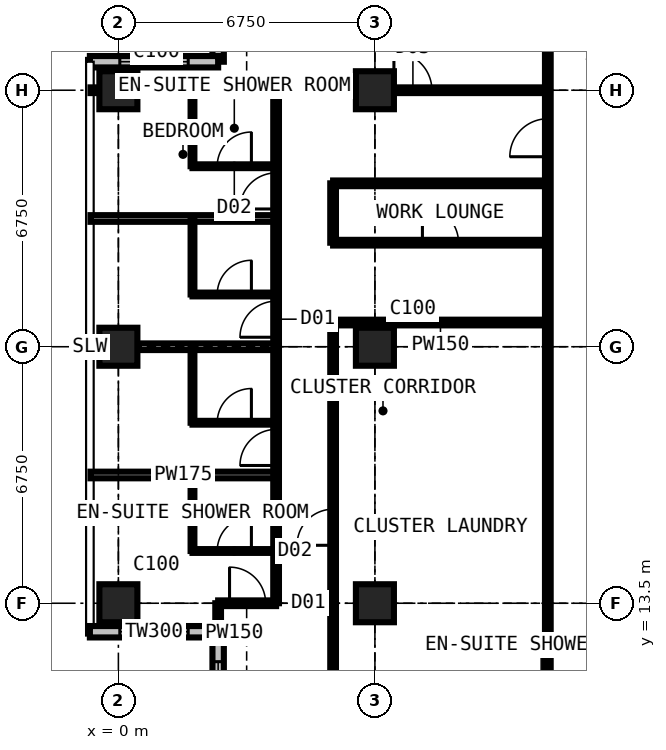
"""IFC4 building model, lengths in metres.
Left out: names, types, materials, properties, quantities, classifications, styles, units other than length and angle.
Written with IfcOpenShell. Run it as: python <this file> out.ifc"""

import sys

from ifc_helpers import new_model, si_unit, direction, frame, frame_2d, origin, origin_2d, place, context, subcontext, project, spatial, rectangle, extrude, element, fill, save


model = new_model("IFC4")
c1 = context("Model", 3, precision=1e-05, world=origin(), true_north=direction((0.0, 1.0)))
c2 = subcontext(c1, "Body", "Model", "MODEL_VIEW")
j1 = project(units=[si_unit("LENGTHUNIT", "METRE"), si_unit("PLANEANGLEUNIT", "RADIAN")], contexts=[c1])
p1 = place(None, origin())
s1 = spatial("IfcSite", under=j1, at=p1, CompositionType="ELEMENT")
p2 = place(p1, origin())
s2 = spatial("IfcBuilding", under=s1, at=p2, CompositionType="ELEMENT")
p3 = place(p2, frame((0.0, 0.0, 251.1)))
s3 = spatial("IfcBuildingStorey", under=s2, at=p3, CompositionType="ELEMENT", Elevation=251.1)
for number, where, z_axis, x_axis in (
    (1, (0.0, 13.5, 0.0), (0.0, 0.0, 1.0), (1.0, 0.0, 0.0)),
    (2, (0.0, 20.25, 0.0), (0.0, 0.0, 1.0), (1.0, 0.0, 0.0)),
    (3, (0.0, 27.0, 0.0), (0.0, 0.0, 1.0), (1.0, 0.0, 0.0)),
    (4, (6.75, 13.5, 0.0), (0.0, 0.0, 1.0), (1.0, 0.0, 0.0)),
    (5, (6.75, 20.25, 0.0), (0.0, 0.0, 1.0), (1.0, 0.0, 0.0)),
    (6, (6.75, 27.0, 0.0), (0.0, 0.0, 1.0), (1.0, 0.0, 0.0)),
):
    element("IfcColumn", number, at=place(p3, frame(where, z_axis=z_axis, x_axis=x_axis)), inside=s3, PredefinedType="COLUMN", context=c2, shape_type="SweptSolid", body=[
        extrude(rectangle(XDim=1.0, YDim=1.0, at=origin_2d()), origin(), (0.0, 0.0, 1.0), 3.6),
    ])
p4 = place(p3, frame((2.625, 31.125, 0.0), z_axis=(0.0, 0.0, 1.0), x_axis=(0.0, -1.0, 0.0)))
e7 = element("IfcWall", 7, at=p4, inside=s3, PredefinedType="SOLIDWALL", context=c2, shape_type="SweptSolid", body=[
    extrude(rectangle(XDim=3.375, YDim=0.3, at=frame_2d((1.688, 0.0))), origin(), (0.0, 0.0, 1.0), 3.3),
])
p5 = place(p4, frame((0.788, 0.0, 0.6)))
e8 = element("IfcOpeningElement", 8, at=p5, cuts=e7, PredefinedType="OPENING", context=c2, shape_type="SweptSolid", body=[
    extrude(rectangle(XDim=1.8, YDim=2.1, at=frame_2d((0.9, 1.05))), frame((0.0, 0.16, 0.0), z_axis=(0.0, -1.0, 0.0), x_axis=(1.0, 0.0, 0.0)), (0.0, 0.0, 1.0), 0.32),
])
p6 = place(p3, frame((2.625, 27.75, 0.0), z_axis=(0.0, 0.0, 1.0), x_axis=(-1.0, 0.0, 0.0)))
e9 = element("IfcWall", 9, at=p6, inside=s3, PredefinedType="SOLIDWALL", context=c2, shape_type="SweptSolid", body=[
    extrude(rectangle(XDim=3.375, YDim=0.3, at=frame_2d((1.688, 0.0))), origin(), (0.0, 0.0, 1.0), 3.3),
])
p7 = place(p6, frame((0.788, 0.0, 0.6)))
e10 = element("IfcOpeningElement", 10, at=p7, cuts=e9, PredefinedType="OPENING", context=c2, shape_type="SweptSolid", body=[
    extrude(rectangle(XDim=1.8, YDim=2.1, at=frame_2d((0.9, 1.05))), frame((0.0, 0.16, 0.0), z_axis=(0.0, -1.0, 0.0), x_axis=(1.0, 0.0, 0.0)), (0.0, 0.0, 1.0), 0.32),
])
p8 = place(p3, frame((-0.75, 12.75, 0.0), z_axis=(0.0, 0.0, 1.0), x_axis=(1.0, 0.0, 0.0)))
e11 = element("IfcWall", 11, at=p8, inside=s3, PredefinedType="SOLIDWALL", context=c2, shape_type="SweptSolid", body=[
    extrude(rectangle(XDim=3.375, YDim=0.3, at=frame_2d((1.688, 0.0))), origin(), (0.0, 0.0, 1.0), 3.3),
])
p9 = place(p8, frame((0.788, 0.0, 0.6)))
e12 = element("IfcOpeningElement", 12, at=p9, cuts=e11, PredefinedType="OPENING", context=c2, shape_type="SweptSolid", body=[
    extrude(rectangle(XDim=1.8, YDim=2.1, at=frame_2d((0.9, 1.05))), frame((0.0, 0.16, 0.0), z_axis=(0.0, -1.0, 0.0), x_axis=(1.0, 0.0, 0.0)), (0.0, 0.0, 1.0), 0.32),
])
p10 = place(p3, frame((2.625, 12.75, 0.0), z_axis=(0.0, 0.0, 1.0), x_axis=(0.0, -1.0, 0.0)))
e13 = element("IfcWall", 13, at=p10, inside=s3, PredefinedType="SOLIDWALL", context=c2, shape_type="SweptSolid", body=[
    extrude(rectangle(XDim=3.375, YDim=0.3, at=frame_2d((1.688, 0.0))), origin(), (0.0, 0.0, 1.0), 3.3),
])
p11 = place(p10, frame((0.788, 0.0, 0.6)))
e14 = element("IfcOpeningElement", 14, at=p11, cuts=e13, PredefinedType="OPENING", context=c2, shape_type="SweptSolid", body=[
    extrude(rectangle(XDim=1.8, YDim=2.1, at=frame_2d((0.9, 1.05))), frame((0.0, 0.16, 0.0), z_axis=(0.0, -1.0, 0.0), x_axis=(1.0, 0.0, 0.0)), (0.0, 0.0, 1.0), 0.32),
])
p12 = place(p3, frame((-0.734, 16.875, 0.0), z_axis=(0.0, 0.0, 1.0), x_axis=(1.0, 0.0, 0.0)))
e15 = element("IfcWall", 15, at=p12, inside=s3, PredefinedType="PARTITIONING", context=c2, shape_type="SweptSolid", body=[
    extrude(rectangle(XDim=4.884, YDim=0.175, at=frame_2d((2.442, 0.0))), origin(), (0.0, 0.0, 1.0), 3.3),
])
p13 = place(p3, frame((-0.734, 20.25, 0.0), z_axis=(0.0, 0.0, 1.0), x_axis=(1.0, 0.0, 0.0)))
e16 = element("IfcWall", 16, at=p13, inside=s3, PredefinedType="PARTITIONING", context=c2, shape_type="SweptSolid", body=[
    extrude(rectangle(XDim=4.884, YDim=0.175, at=frame_2d((2.442, 0.0))), origin(), (0.0, 0.0, 1.0), 2.802),
])
p14 = place(p3, frame((-0.734, 23.625, 0.0), z_axis=(0.0, 0.0, 1.0), x_axis=(1.0, 0.0, 0.0)))
e17 = element("IfcWall", 17, at=p14, inside=s3, PredefinedType="PARTITIONING", context=c2, shape_type="SweptSolid", body=[
    extrude(rectangle(XDim=4.884, YDim=0.175, at=frame_2d((2.442, 0.0))), origin(), (0.0, 0.0, 1.0), 3.3),
])
p15 = place(p3, frame((-0.734, 27.0, 0.0), z_axis=(0.0, 0.0, 1.0), x_axis=(1.0, 0.0, 0.0)))
e18 = element("IfcWall", 18, at=p15, inside=s3, PredefinedType="PARTITIONING", context=c2, shape_type="SweptSolid", body=[
    extrude(rectangle(XDim=12.034, YDim=0.15, at=frame_2d((6.017, 0.0))), origin(), (0.0, 0.0, 1.0), 2.802),
])
p16 = place(p15, frame((7.984, 0.0, 0.0)))
e19 = element("IfcOpeningElement", 19, at=p16, cuts=e18, PredefinedType="OPENING", context=c2, shape_type="SweptSolid", body=[
    extrude(rectangle(XDim=1.0, YDim=2.2, at=frame_2d((0.5, 1.1))), frame((0.0, 0.085, 0.0), z_axis=(0.0, -1.0, 0.0), x_axis=(1.0, 0.0, 0.0)), (0.0, 0.0, 1.0), 0.17),
])
p17 = place(p3, frame((1.95, 14.875, 0.0), z_axis=(0.0, 0.0, 1.0), x_axis=(0.0, 1.0, 0.0)))
e20 = element("IfcWall", 20, at=p17, inside=s3, PredefinedType="PARTITIONING", context=c2, shape_type="SweptSolid", body=[
    extrude(rectangle(XDim=2.0, YDim=0.1, at=frame_2d((1.0, 0.0))), origin(), (0.0, 0.0, 1.0), 3.3),
])
p18 = place(p3, frame((1.95, 14.875, 0.0), z_axis=(0.0, 0.0, 1.0), x_axis=(1.0, 0.0, 0.0)))
e21 = element("IfcWall", 21, at=p18, inside=s3, PredefinedType="PARTITIONING", context=c2, shape_type="SweptSolid", body=[
    extrude(rectangle(XDim=2.2, YDim=0.1, at=frame_2d((1.1, 0.0))), origin(), (0.0, 0.0, 1.0), 3.3),
])
p19 = place(p18, frame((0.65, 0.0, 0.0)))
e22 = element("IfcOpeningElement", 22, at=p19, cuts=e21, PredefinedType="OPENING", context=c2, shape_type="SweptSolid", body=[
    extrude(rectangle(XDim=0.9, YDim=2.2, at=frame_2d((0.45, 1.1))), frame((0.0, 0.06, 0.0), z_axis=(0.0, -1.0, 0.0), x_axis=(1.0, 0.0, 0.0)), (0.0, 0.0, 1.0), 0.12),
])
p20 = place(p3, frame((1.95, 18.25, 0.0), z_axis=(0.0, 0.0, 1.0), x_axis=(0.0, 1.0, 0.0)))
e23 = element("IfcWall", 23, at=p20, inside=s3, PredefinedType="PARTITIONING", context=c2, shape_type="SweptSolid", body=[
    extrude(rectangle(XDim=2.0, YDim=0.1, at=frame_2d((1.0, 0.0))), origin(), (0.0, 0.0, 1.0), 3.3),
])
p21 = place(p3, frame((1.95, 18.25, 0.0), z_axis=(0.0, 0.0, 1.0), x_axis=(1.0, 0.0, 0.0)))
e24 = element("IfcWall", 24, at=p21, inside=s3, PredefinedType="PARTITIONING", context=c2, shape_type="SweptSolid", body=[
    extrude(rectangle(XDim=2.2, YDim=0.1, at=frame_2d((1.1, 0.0))), origin(), (0.0, 0.0, 1.0), 3.3),
])
p22 = place(p21, frame((0.65, 0.0, 0.0)))
e25 = element("IfcOpeningElement", 25, at=p22, cuts=e24, PredefinedType="OPENING", context=c2, shape_type="SweptSolid", body=[
    extrude(rectangle(XDim=0.9, YDim=2.2, at=frame_2d((0.45, 1.1))), frame((0.0, 0.06, 0.0), z_axis=(0.0, -1.0, 0.0), x_axis=(1.0, 0.0, 0.0)), (0.0, 0.0, 1.0), 0.12),
])
p23 = place(p3, frame((1.95, 21.625, 0.0), z_axis=(0.0, 0.0, 1.0), x_axis=(0.0, 1.0, 0.0)))
e26 = element("IfcWall", 26, at=p23, inside=s3, PredefinedType="PARTITIONING", context=c2, shape_type="SweptSolid", body=[
    extrude(rectangle(XDim=2.0, YDim=0.1, at=frame_2d((1.0, 0.0))), origin(), (0.0, 0.0, 1.0), 3.3),
])
p24 = place(p3, frame((1.95, 21.625, 0.0), z_axis=(0.0, 0.0, 1.0), x_axis=(1.0, 0.0, 0.0)))
e27 = element("IfcWall", 27, at=p24, inside=s3, PredefinedType="PARTITIONING", context=c2, shape_type="SweptSolid", body=[
    extrude(rectangle(XDim=2.2, YDim=0.1, at=frame_2d((1.1, 0.0))), origin(), (0.0, 0.0, 1.0), 3.3),
])
p25 = place(p24, frame((0.65, 0.0, 0.0)))
e28 = element("IfcOpeningElement", 28, at=p25, cuts=e27, PredefinedType="OPENING", context=c2, shape_type="SweptSolid", body=[
    extrude(rectangle(XDim=0.9, YDim=2.2, at=frame_2d((0.45, 1.1))), frame((0.0, 0.06, 0.0), z_axis=(0.0, -1.0, 0.0), x_axis=(1.0, 0.0, 0.0)), (0.0, 0.0, 1.0), 0.12),
])
p26 = place(p3, frame((1.95, 25.0, 0.0), z_axis=(0.0, 0.0, 1.0), x_axis=(0.0, 1.0, 0.0)))
e29 = element("IfcWall", 29, at=p26, inside=s3, PredefinedType="PARTITIONING", context=c2, shape_type="SweptSolid", body=[
    extrude(rectangle(XDim=2.0, YDim=0.1, at=frame_2d((1.0, 0.0))), origin(), (0.0, 0.0, 1.0), 3.3),
])
p27 = place(p3, frame((1.95, 25.0, 0.0), z_axis=(0.0, 0.0, 1.0), x_axis=(1.0, 0.0, 0.0)))
e30 = element("IfcWall", 30, at=p27, inside=s3, PredefinedType="PARTITIONING", context=c2, shape_type="SweptSolid", body=[
    extrude(rectangle(XDim=2.2, YDim=0.1, at=frame_2d((1.1, 0.0))), origin(), (0.0, 0.0, 1.0), 3.3),
])
p28 = place(p27, frame((0.65, 0.0, 0.0)))
e31 = element("IfcOpeningElement", 31, at=p28, cuts=e30, PredefinedType="OPENING", context=c2, shape_type="SweptSolid", body=[
    extrude(rectangle(XDim=0.9, YDim=2.2, at=frame_2d((0.45, 1.1))), frame((0.0, 0.06, 0.0), z_axis=(0.0, -1.0, 0.0), x_axis=(1.0, 0.0, 0.0)), (0.0, 0.0, 1.0), 0.12),
])
p29 = place(p3, frame((2.625, 12.766, 0.0), z_axis=(0.0, 0.0, 1.0), x_axis=(0.0, 1.0, 0.0)))
e32 = element("IfcWall", 32, at=p29, inside=s3, PredefinedType="PARTITIONING", context=c2, shape_type="SweptSolid", body=[
    extrude(rectangle(XDim=0.734, YDim=0.15, at=frame_2d((0.367, 0.0))), origin(), (0.0, 0.0, 1.0), 3.3),
])
p30 = place(p3, frame((2.625, 13.5, 0.0), z_axis=(0.0, 0.0, 1.0), x_axis=(1.0, 0.0, 0.0)))
e33 = element("IfcWall", 33, at=p30, inside=s3, PredefinedType="PARTITIONING", context=c2, shape_type="SweptSolid", body=[
    extrude(rectangle(XDim=1.525, YDim=0.15, at=frame_2d((0.762, 0.0))), origin(), (0.0, 0.0, 1.0), 2.802),
])
p31 = place(p30, frame((0.3, 0.0, 0.0)))
e34 = element("IfcOpeningElement", 34, at=p31, cuts=e33, PredefinedType="OPENING", context=c2, shape_type="SweptSolid", body=[
    extrude(rectangle(XDim=0.95, YDim=2.2, at=frame_2d((0.475, 1.1))), frame((0.0, 0.085, 0.0), z_axis=(0.0, -1.0, 0.0), x_axis=(1.0, 0.0, 0.0)), (0.0, 0.0, 1.0), 0.17),
])
p32 = place(p3, frame((4.15, 13.5, 0.0), z_axis=(0.0, 0.0, 1.0), x_axis=(0.0, 1.0, 0.0)))
e35 = element("IfcWall", 35, at=p32, inside=s3, PredefinedType="PARTITIONING", context=c2, shape_type="SweptSolid", body=[
    extrude(rectangle(XDim=13.5, YDim=0.15, at=frame_2d((6.75, 0.0))), origin(), (0.0, 0.0, 1.0), 3.3),
])
p33 = place(p32, frame((3.625, 0.0, 0.0)))
e36 = element("IfcOpeningElement", 36, at=p33, cuts=e35, PredefinedType="OPENING", context=c2, shape_type="SweptSolid", body=[
    extrude(rectangle(XDim=0.95, YDim=2.2, at=frame_2d((0.475, 1.1))), frame((0.0, 0.085, 0.0), z_axis=(0.0, -1.0, 0.0), x_axis=(1.0, 0.0, 0.0)), (0.0, 0.0, 1.0), 0.17),
])
p34 = place(p32, frame((7.0, 0.0, 0.0)))
e37 = element("IfcOpeningElement", 37, at=p34, cuts=e35, PredefinedType="OPENING", context=c2, shape_type="SweptSolid", body=[
    extrude(rectangle(XDim=0.95, YDim=2.2, at=frame_2d((0.475, 1.1))), frame((0.0, 0.085, 0.0), z_axis=(0.0, -1.0, 0.0), x_axis=(1.0, 0.0, 0.0)), (0.0, 0.0, 1.0), 0.17),
])
p35 = place(p32, frame((10.375, 0.0, 0.0)))
e38 = element("IfcOpeningElement", 38, at=p35, cuts=e35, PredefinedType="OPENING", context=c2, shape_type="SweptSolid", body=[
    extrude(rectangle(XDim=0.95, YDim=2.2, at=frame_2d((0.475, 1.1))), frame((0.0, 0.085, 0.0), z_axis=(0.0, -1.0, 0.0), x_axis=(1.0, 0.0, 0.0)), (0.0, 0.0, 1.0), 0.17),
])
p36 = place(p3, frame((5.65, 10.125, 0.0), z_axis=(0.0, 0.0, 1.0), x_axis=(0.0, 1.0, 0.0)))
e39 = element("IfcWall", 39, at=p36, inside=s3, PredefinedType="PARTITIONING", context=c2, shape_type="SweptSolid", body=[
    extrude(rectangle(XDim=10.762, YDim=0.15, at=frame_2d((5.381, 0.0))), origin(), (0.0, 0.0, 1.0), 3.3),
])
p37 = place(p36, frame((4.9, 0.0, 0.0)))
e40 = element("IfcOpeningElement", 40, at=p37, cuts=e39, PredefinedType="OPENING", context=c2, shape_type="SweptSolid", body=[
    extrude(rectangle(XDim=0.95, YDim=2.2, at=frame_2d((0.475, 1.1))), frame((0.0, 0.085, 0.0), z_axis=(0.0, -1.0, 0.0), x_axis=(1.0, 0.0, 0.0)), (0.0, 0.0, 1.0), 0.17),
])
p38 = place(p3, frame((5.65, 20.887, 0.0), z_axis=(0.0, 0.0, 1.0), x_axis=(1.0, 0.0, 0.0)))
e41 = element("IfcWall", 41, at=p38, inside=s3, PredefinedType="PARTITIONING", context=c2, shape_type="SweptSolid", body=[
    extrude(rectangle(XDim=5.65, YDim=0.15, at=frame_2d((2.825, 0.0))), origin(), (0.0, 0.0, 1.0), 3.3),
])
p39 = place(p3, frame((5.65, 22.988, 0.0), z_axis=(0.0, 0.0, 1.0), x_axis=(0.0, 1.0, 0.0)))
e42 = element("IfcWall", 42, at=p39, inside=s3, PredefinedType="PARTITIONING", context=c2, shape_type="SweptSolid", body=[
    extrude(rectangle(XDim=1.562, YDim=0.15, at=frame_2d((0.781, 0.0))), origin(), (0.0, 0.0, 1.0), 3.3),
])
p40 = place(p3, frame((5.65, 22.988, 0.0), z_axis=(0.0, 0.0, 1.0), x_axis=(1.0, 0.0, 0.0)))
e43 = element("IfcWall", 43, at=p40, inside=s3, PredefinedType="PARTITIONING", context=c2, shape_type="SweptSolid", body=[
    extrude(rectangle(XDim=5.65, YDim=0.15, at=frame_2d((2.825, 0.0))), origin(), (0.0, 0.0, 1.0), 3.3),
])
p41 = place(p40, frame((2.35, 0.0, 0.0)))
e44 = element("IfcOpeningElement", 44, at=p41, cuts=e43, PredefinedType="OPENING", context=c2, shape_type="SweptSolid", body=[
    extrude(rectangle(XDim=0.95, YDim=2.2, at=frame_2d((0.475, 1.1))), frame((0.0, 0.085, 0.0), z_axis=(0.0, -1.0, 0.0), x_axis=(1.0, 0.0, 0.0)), (0.0, 0.0, 1.0), 0.17),
])
p42 = place(p3, frame((5.65, 24.55, 0.0), z_axis=(0.0, 0.0, 1.0), x_axis=(1.0, 0.0, 0.0)))
e45 = element("IfcWall", 45, at=p42, inside=s3, PredefinedType="PARTITIONING", context=c2, shape_type="SweptSolid", body=[
    extrude(rectangle(XDim=5.65, YDim=0.15, at=frame_2d((2.825, 0.0))), origin(), (0.0, 0.0, 1.0), 3.3),
])
p43 = place(p3, frame((11.3, 11.3, 0.0), z_axis=(0.0, 0.0, 1.0), x_axis=(0.0, 1.0, 0.0)))
e46 = element("IfcWall", 46, at=p43, inside=s3, PredefinedType="PARTITIONING", context=c2, shape_type="SweptSolid", body=[
    extrude(rectangle(XDim=19.075, YDim=0.15, at=frame_2d((9.538, 0.0))), origin(), (0.0, 0.0, 1.0), 3.3),
])
p44 = place(p43, frame((13.95, 0.0, 0.0)))
e47 = element("IfcOpeningElement", 47, at=p44, cuts=e46, PredefinedType="OPENING", context=c2, shape_type="SweptSolid", body=[
    extrude(rectangle(XDim=1.0, YDim=2.2, at=frame_2d((0.5, 1.1))), frame((0.0, 0.085, 0.0), z_axis=(0.0, -1.0, 0.0), x_axis=(1.0, 0.0, 0.0)), (0.0, 0.0, 1.0), 0.17),
])
p45 = place(p7, origin())
e48 = element("IfcWindow", 48, at=p45, inside=s3, PartitioningType="SINGLE_PANEL", PredefinedType="WINDOW", context=c2, shape_type="SweptSolid", body=[
    extrude(rectangle(XDim=1.8, YDim=2.1, at=frame_2d((0.9, 1.05))), frame((0.0, 0.03, 0.0), z_axis=(0.0, -1.0, 0.0), x_axis=(1.0, 0.0, 0.0)), (0.0, 0.0, 1.0), 0.06),
])
fill(e10, e48)
p46 = place(p9, origin())
e49 = element("IfcWindow", 49, at=p46, inside=s3, PartitioningType="SINGLE_PANEL", PredefinedType="WINDOW", context=c2, shape_type="SweptSolid", body=[
    extrude(rectangle(XDim=1.8, YDim=2.1, at=frame_2d((0.9, 1.05))), frame((0.0, 0.03, 0.0), z_axis=(0.0, -1.0, 0.0), x_axis=(1.0, 0.0, 0.0)), (0.0, 0.0, 1.0), 0.06),
])
fill(e12, e49)
p47 = place(p11, origin())
e50 = element("IfcWindow", 50, at=p47, inside=s3, PartitioningType="SINGLE_PANEL", PredefinedType="WINDOW", context=c2, shape_type="SweptSolid", body=[
    extrude(rectangle(XDim=1.8, YDim=2.1, at=frame_2d((0.9, 1.05))), frame((0.0, 0.03, 0.0), z_axis=(0.0, -1.0, 0.0), x_axis=(1.0, 0.0, 0.0)), (0.0, 0.0, 1.0), 0.06),
])
fill(e14, e50)
p48 = place(p31, origin())
e51 = element("IfcDoor", 51, at=p48, inside=s3, OperationType="SINGLE_SWING_LEFT", PredefinedType="DOOR", context=c2, shape_type="SweptSolid", body=[
    extrude(rectangle(XDim=0.95, YDim=2.2, at=frame_2d((0.475, 1.1))), frame((0.0, 0.025, 0.0), z_axis=(0.0, -1.0, 0.0), x_axis=(1.0, 0.0, 0.0)), (0.0, 0.0, 1.0), 0.05),
])
fill(e34, e51)
p49 = place(p19, origin())
e52 = element("IfcDoor", 52, at=p49, inside=s3, OperationType="SINGLE_SWING_RIGHT", PredefinedType="DOOR", context=c2, shape_type="SweptSolid", body=[
    extrude(rectangle(XDim=0.9, YDim=2.2, at=frame_2d((0.45, 1.1))), frame((0.0, 0.025, 0.0), z_axis=(0.0, -1.0, 0.0), x_axis=(1.0, 0.0, 0.0)), (0.0, 0.0, 1.0), 0.05),
])
fill(e22, e52)
p50 = place(p33, origin())
e53 = element("IfcDoor", 53, at=p50, inside=s3, OperationType="SINGLE_SWING_LEFT", PredefinedType="DOOR", context=c2, shape_type="SweptSolid", body=[
    extrude(rectangle(XDim=0.95, YDim=2.2, at=frame_2d((0.475, 1.1))), frame((0.0, 0.025, 0.0), z_axis=(0.0, -1.0, 0.0), x_axis=(1.0, 0.0, 0.0)), (0.0, 0.0, 1.0), 0.05),
])
fill(e36, e53)
p51 = place(p22, origin())
e54 = element("IfcDoor", 54, at=p51, inside=s3, OperationType="SINGLE_SWING_RIGHT", PredefinedType="DOOR", context=c2, shape_type="SweptSolid", body=[
    extrude(rectangle(XDim=0.9, YDim=2.2, at=frame_2d((0.45, 1.1))), frame((0.0, 0.025, 0.0), z_axis=(0.0, -1.0, 0.0), x_axis=(1.0, 0.0, 0.0)), (0.0, 0.0, 1.0), 0.05),
])
fill(e25, e54)
p52 = place(p34, origin())
e55 = element("IfcDoor", 55, at=p52, inside=s3, OperationType="SINGLE_SWING_LEFT", PredefinedType="DOOR", context=c2, shape_type="SweptSolid", body=[
    extrude(rectangle(XDim=0.95, YDim=2.2, at=frame_2d((0.475, 1.1))), frame((0.0, 0.025, 0.0), z_axis=(0.0, -1.0, 0.0), x_axis=(1.0, 0.0, 0.0)), (0.0, 0.0, 1.0), 0.05),
])
fill(e37, e55)
p53 = place(p25, origin())
e56 = element("IfcDoor", 56, at=p53, inside=s3, OperationType="SINGLE_SWING_RIGHT", PredefinedType="DOOR", context=c2, shape_type="SweptSolid", body=[
    extrude(rectangle(XDim=0.9, YDim=2.2, at=frame_2d((0.45, 1.1))), frame((0.0, 0.025, 0.0), z_axis=(0.0, -1.0, 0.0), x_axis=(1.0, 0.0, 0.0)), (0.0, 0.0, 1.0), 0.05),
])
fill(e28, e56)
p54 = place(p35, origin())
e57 = element("IfcDoor", 57, at=p54, inside=s3, OperationType="SINGLE_SWING_LEFT", PredefinedType="DOOR", context=c2, shape_type="SweptSolid", body=[
    extrude(rectangle(XDim=0.95, YDim=2.2, at=frame_2d((0.475, 1.1))), frame((0.0, 0.025, 0.0), z_axis=(0.0, -1.0, 0.0), x_axis=(1.0, 0.0, 0.0)), (0.0, 0.0, 1.0), 0.05),
])
fill(e38, e57)
p55 = place(p28, origin())
e58 = element("IfcDoor", 58, at=p55, inside=s3, OperationType="SINGLE_SWING_RIGHT", PredefinedType="DOOR", context=c2, shape_type="SweptSolid", body=[
    extrude(rectangle(XDim=0.9, YDim=2.2, at=frame_2d((0.45, 1.1))), frame((0.0, 0.025, 0.0), z_axis=(0.0, -1.0, 0.0), x_axis=(1.0, 0.0, 0.0)), (0.0, 0.0, 1.0), 0.05),
])
fill(e31, e58)
p56 = place(p16, origin())
e59 = element("IfcDoor", 59, at=p56, inside=s3, OperationType="SINGLE_SWING_LEFT", PredefinedType="DOOR", context=c2, shape_type="SweptSolid", body=[
    extrude(rectangle(XDim=1.0, YDim=2.2, at=frame_2d((0.5, 1.1))), frame((0.0, 0.025, 0.0), z_axis=(0.0, -1.0, 0.0), x_axis=(1.0, 0.0, 0.0)), (0.0, 0.0, 1.0), 0.05),
])
fill(e19, e59)
p57 = place(p44, origin())
e60 = element("IfcDoor", 60, at=p57, inside=s3, OperationType="SINGLE_SWING_LEFT", PredefinedType="DOOR", context=c2, shape_type="SweptSolid", body=[
    extrude(rectangle(XDim=1.0, YDim=2.2, at=frame_2d((0.5, 1.1))), frame((0.0, 0.025, 0.0), z_axis=(0.0, -1.0, 0.0), x_axis=(1.0, 0.0, 0.0)), (0.0, 0.0, 1.0), 0.05),
])
fill(e47, e60)
p58 = place(p37, origin())
e61 = element("IfcDoor", 61, at=p58, inside=s3, OperationType="SINGLE_SWING_LEFT", PredefinedType="DOOR", context=c2, shape_type="SweptSolid", body=[
    extrude(rectangle(XDim=0.95, YDim=2.2, at=frame_2d((0.475, 1.1))), frame((0.0, 0.025, 0.0), z_axis=(0.0, -1.0, 0.0), x_axis=(1.0, 0.0, 0.0)), (0.0, 0.0, 1.0), 0.05),
])
fill(e40, e61)
p59 = place(p41, origin())
e62 = element("IfcDoor", 62, at=p59, inside=s3, OperationType="SINGLE_SWING_LEFT", PredefinedType="DOOR", context=c2, shape_type="SweptSolid", body=[
    extrude(rectangle(XDim=0.95, YDim=2.2, at=frame_2d((0.475, 1.1))), frame((0.0, 0.025, 0.0), z_axis=(0.0, -1.0, 0.0), x_axis=(1.0, 0.0, 0.0)), (0.0, 0.0, 1.0), 0.05),
])
fill(e44, e62)
save(model, sys.argv[1])
